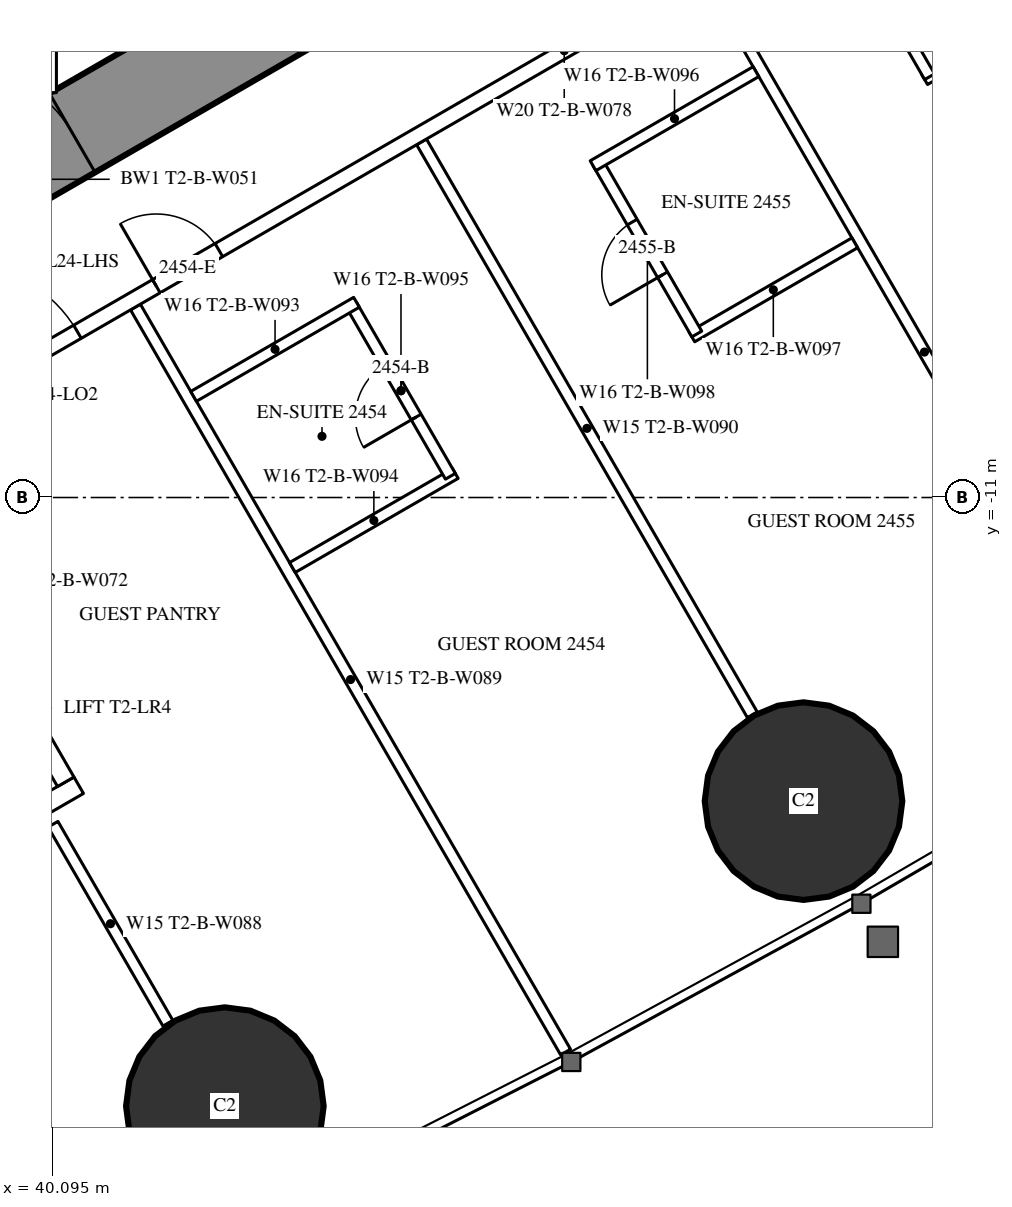
"""IFC4 building model, lengths in metres.
Left out: names, types, materials, properties, quantities, classifications, styles, units other than length and angle.
Written with IfcOpenShell. Run it as: python <this file> out.ifc"""

import sys

from ifc_helpers import new_model, si_unit, direction, frame, frame_2d, origin, origin_2d, place, context, subcontext, project, spatial, rectangle, hollow_circle, extrude, element, fill, save


model = new_model("IFC4")
c1 = context("Model", 3, precision=1e-05, world=origin(), true_north=direction((0.0, 1.0)))
c2 = subcontext(c1, "Body", "Model", "MODEL_VIEW")
j1 = project(units=[si_unit("LENGTHUNIT", "METRE"), si_unit("PLANEANGLEUNIT", "RADIAN")], contexts=[c1])
p1 = place(None, origin())
s1 = spatial("IfcSite", under=j1, at=p1, CompositionType="ELEMENT")
p2 = place(p1, origin())
s2 = spatial("IfcBuilding", under=s1, at=p2, CompositionType="ELEMENT")
p3 = place(p2, frame((0.0, 0.0, 94.1)))
s3 = spatial("IfcBuildingStorey", under=s2, at=p3, CompositionType="ELEMENT", Elevation=94.1)
for number, where, z_axis, x_axis in (
    (1, (42.366, -19.007, 0.0), (0.0, 0.0, 1.0), (1.0, 0.0, 0.0)),
    (2, (49.979, -14.994, 0.0), (0.0, 0.0, 1.0), (1.0, 0.0, 0.0)),
):
    element("IfcColumn", number, at=place(p3, frame(where, z_axis=z_axis, x_axis=x_axis)), inside=s3, PredefinedType="COLUMN", context=c2, shape_type="SweptSolid", body=[
        extrude(hollow_circle(Radius=1.3, WallThickness=0.1, at=origin_2d()), origin(), (0.0, 0.0, 1.0), 3.5),
    ])
p4 = place(p3, frame((27.2, -13.8, 0.0), z_axis=(0.0, 0.0, 1.0), x_axis=(0.866027159892, 0.499996958321, 0.0)))
e3 = element("IfcWall", 3, at=p4, inside=s3, PredefinedType="SHEAR", context=c2, shape_type="SweptSolid", body=[
    extrude(rectangle(XDim=27.947, YDim=1.2, at=frame_2d((13.973, 0.0))), origin(), (0.0, 0.0, 1.0), 3.5),
])
p5 = place(p4, frame((4.6, 0.0, 0.0)))
e4 = element("IfcOpeningElement", 4, at=p5, cuts=e3, PredefinedType="OPENING", context=c2, shape_type="SweptSolid", body=[
    extrude(rectangle(XDim=1.0, YDim=2.2, at=frame_2d((0.5, 1.1))), frame((0.0, 0.61, 0.0), z_axis=(0.0, -1.0, 0.0), x_axis=(1.0, 0.0, 0.0)), (0.0, 0.0, 1.0), 1.22),
])
p6 = place(p4, frame((13.395, 0.0, 0.0)))
e5 = element("IfcOpeningElement", 5, at=p6, cuts=e3, PredefinedType="OPENING", context=c2, shape_type="SweptSolid", body=[
    extrude(rectangle(XDim=1.8, YDim=2.2, at=frame_2d((0.9, 1.1))), frame((0.0, 0.61, 0.0), z_axis=(0.0, -1.0, 0.0), x_axis=(1.0, 0.0, 0.0)), (0.0, 0.0, 1.0), 1.22),
])
p7 = place(p3, frame((41.19, -8.494, 0.0), z_axis=(0.0, 0.0, 1.0), x_axis=(0.49999258054, -0.866029687369, 0.0)))
e6 = element("IfcWall", 6, at=p7, inside=s3, PredefinedType="PARTITIONING", context=c2, shape_type="SweptSolid", body=[
    extrude(rectangle(XDim=11.318, YDim=0.15, at=frame_2d((5.659, 0.0))), origin(), (0.0, 0.0, 1.0), 3.25),
])
p8 = place(p3, frame((44.954, -6.321, 0.0), z_axis=(0.0, 0.0, 1.0), x_axis=(0.500018676722, -0.866014620505, 0.0)))
e7 = element("IfcWall", 7, at=p8, inside=s3, PredefinedType="PARTITIONING", context=c2, shape_type="SweptSolid", body=[
    extrude(rectangle(XDim=8.704, YDim=0.15, at=frame_2d((4.352, 0.0))), origin(), (0.0, 0.0, 1.0), 2.2),
])
p9 = place(p3, frame((48.719, -4.147, 0.0), z_axis=(0.0, 0.0, 1.0), x_axis=(0.499990498062, -0.866030889661, 0.0)))
e8 = element("IfcWall", 8, at=p9, inside=s3, PredefinedType="PARTITIONING", context=c2, shape_type="SweptSolid", body=[
    extrude(rectangle(XDim=11.406, YDim=0.15, at=frame_2d((5.703, 0.0))), origin(), (0.0, 0.0, 1.0), 3.25),
])
p10 = place(p3, frame((40.105, -15.299, 0.0), z_axis=(0.0, 0.0, 1.0), x_axis=(0.499978822259, -0.866037630414, 0.0)))
e9 = element("IfcWall", 9, at=p10, inside=s3, PredefinedType="PARTITIONING", context=c2, shape_type="SweptSolid", body=[
    extrude(rectangle(XDim=3.023, YDim=0.15, at=frame_2d((1.511, 0.0))), origin(), (0.0, 0.0, 1.0), 3.25),
])
p11 = place(p3, frame((37.96, -10.243, 0.0), z_axis=(0.0, 0.0, 1.0), x_axis=(0.866026429433, 0.499998223521, 0.0)))
e10 = element("IfcWall", 10, at=p11, inside=s3, PredefinedType="PARTITIONING", context=c2, shape_type="SweptSolid", body=[
    extrude(rectangle(XDim=20.487, YDim=0.2, at=frame_2d((10.243, 0.0))), origin(), (0.0, 0.0, 1.0), 3.25),
])
p12 = place(p11, frame((4.047, 0.0, 0.0)))
e11 = element("IfcOpeningElement", 11, at=p12, cuts=e10, PredefinedType="OPENING", context=c2, shape_type="SweptSolid", body=[
    extrude(rectangle(XDim=0.95, YDim=2.2, at=frame_2d((0.475, 1.1))), frame((0.0, 0.11, 0.0), z_axis=(0.0, -1.0, 0.0), x_axis=(1.0, 0.0, 0.0)), (0.0, 0.0, 1.0), 0.22),
])
p13 = place(p11, frame((11.04, 0.0, 0.0)))
e12 = element("IfcOpeningElement", 12, at=p13, cuts=e10, PredefinedType="OPENING", context=c2, shape_type="SweptSolid", body=[
    extrude(rectangle(XDim=0.95, YDim=2.2, at=frame_2d((0.475, 1.1))), frame((0.0, 0.11, 0.0), z_axis=(0.0, -1.0, 0.0), x_axis=(1.0, 0.0, 0.0)), (0.0, 0.0, 1.0), 0.22),
])
p14 = place(p11, frame((13.035, 0.0, 0.0)))
e13 = element("IfcOpeningElement", 13, at=p14, cuts=e10, PredefinedType="OPENING", context=c2, shape_type="SweptSolid", body=[
    extrude(rectangle(XDim=0.95, YDim=2.2, at=frame_2d((0.475, 1.1))), frame((0.0, 0.11, 0.0), z_axis=(0.0, -1.0, 0.0), x_axis=(1.0, 0.0, 0.0)), (0.0, 0.0, 1.0), 0.22),
])
p15 = place(p11, frame((17.085, 0.0, 0.0)))
e14 = element("IfcOpeningElement", 14, at=p15, cuts=e10, PredefinedType="OPENING", context=c2, shape_type="SweptSolid", body=[
    extrude(rectangle(XDim=0.95, YDim=2.2, at=frame_2d((0.475, 1.1))), frame((0.0, 0.11, 0.0), z_axis=(0.0, -1.0, 0.0), x_axis=(1.0, 0.0, 0.0)), (0.0, 0.0, 1.0), 0.22),
])
p16 = place(p11, frame((1.048, 0.0, 0.0)))
e15 = element("IfcOpeningElement", 15, at=p16, cuts=e10, PredefinedType="OPENING", context=c2, shape_type="SweptSolid", body=[
    extrude(rectangle(XDim=1.8, YDim=2.2, at=frame_2d((0.9, 1.1))), frame((0.0, 0.11, 0.0), z_axis=(0.0, -1.0, 0.0), x_axis=(1.0, 0.0, 0.0)), (0.0, 0.0, 1.0), 0.22),
])
p17 = place(p3, frame((43.255, -11.921, 0.0), z_axis=(0.0, 0.0, 1.0), x_axis=(0.866006523861, 0.500032699561, 0.0)))
e16 = element("IfcWall", 16, at=p17, inside=s3, PredefinedType="PARTITIONING", context=c2, shape_type="SweptSolid", body=[
    extrude(rectangle(XDim=2.475, YDim=0.15, at=frame_2d((1.237, 0.0))), origin(), (0.0, 0.0, 1.0), 3.25),
])
p18 = place(p3, frame((44.033, -8.469, 0.0), z_axis=(0.0, 0.0, 1.0), x_axis=(0.500047596559, -0.865997922154, 0.0)))
e17 = element("IfcWall", 17, at=p18, inside=s3, PredefinedType="PARTITIONING", context=c2, shape_type="SweptSolid", body=[
    extrude(rectangle(XDim=2.6, YDim=0.15, at=frame_2d((1.3, 0.0))), origin(), (0.0, 0.0, 1.0), 3.25),
])
p19 = place(p18, frame((0.9, 0.0, 0.0)))
e18 = element("IfcOpeningElement", 18, at=p19, cuts=e17, PredefinedType="OPENING", context=c2, shape_type="SweptSolid", body=[
    extrude(rectangle(XDim=0.8, YDim=2.2, at=frame_2d((0.4, 1.1))), frame((0.0, 0.085, 0.0), z_axis=(0.0, -1.0, 0.0), x_axis=(1.0, 0.0, 0.0)), (0.0, 0.0, 1.0), 0.17),
])
p20 = place(p3, frame((41.955, -9.669, 0.0), z_axis=(0.0, 0.0, 1.0), x_axis=(0.866006523861, 0.500032699561, 0.0)))
e19 = element("IfcWall", 19, at=p20, inside=s3, PredefinedType="PARTITIONING", context=c2, shape_type="SweptSolid", body=[
    extrude(rectangle(XDim=2.475, YDim=0.15, at=frame_2d((1.237, 0.0))), origin(), (0.0, 0.0, 1.0), 3.25),
])
p21 = place(p3, frame((48.51, -8.887, 0.0), z_axis=(0.0, 0.0, 1.0), x_axis=(0.866031185235, 0.4999899861, 0.0)))
e20 = element("IfcWall", 20, at=p21, inside=s3, PredefinedType="PARTITIONING", context=c2, shape_type="SweptSolid", body=[
    extrude(rectangle(XDim=2.475, YDim=0.15, at=frame_2d((1.238, 0.0))), origin(), (0.0, 0.0, 1.0), 3.25),
])
p22 = place(p3, frame((47.275, -6.597, 0.0), z_axis=(0.0, 0.0, 1.0), x_axis=(0.499936506574, -0.866062058628, 0.0)))
e21 = element("IfcWall", 21, at=p22, inside=s3, PredefinedType="PARTITIONING", context=c2, shape_type="SweptSolid", body=[
    extrude(rectangle(XDim=2.6, YDim=0.15, at=frame_2d((1.3, 0.0))), origin(), (0.0, 0.0, 1.0), 3.25),
])
p23 = place(p22, frame((0.9, 0.0, 0.0)))
e22 = element("IfcOpeningElement", 22, at=p23, cuts=e21, PredefinedType="OPENING", context=c2, shape_type="SweptSolid", body=[
    extrude(rectangle(XDim=0.8, YDim=2.2, at=frame_2d((0.4, 1.1))), frame((0.0, 0.085, 0.0), z_axis=(0.0, -1.0, 0.0), x_axis=(1.0, 0.0, 0.0)), (0.0, 0.0, 1.0), 0.17),
])
for number, where, z_axis, x_axis in (
    (23, (47.21, -6.635, 0.0), (0.0, 0.0, 1.0), (0.866, 0.5, 0.0)),
    (24, (51.573, -5.502, 0.0), (0.0, 0.0, 1.0), (0.866, 0.5, 0.0)),
):
    element("IfcWall", number, at=place(p3, frame(where, z_axis=z_axis, x_axis=x_axis)), inside=s3, PredefinedType="PARTITIONING", context=c2, shape_type="SweptSolid", body=[
        extrude(rectangle(XDim=2.475, YDim=0.15, at=frame_2d((1.237, 0.0))), origin(), (0.0, 0.0, 1.0), 3.25),
    ])
p24 = place(p3, frame((50.338, -3.213, 0.0), z_axis=(0.0, 0.0, 1.0), x_axis=(0.500047596559, -0.865997922154, 0.0)))
e25 = element("IfcWall", 25, at=p24, inside=s3, PredefinedType="PARTITIONING", context=c2, shape_type="SweptSolid", body=[
    extrude(rectangle(XDim=2.6, YDim=0.15, at=frame_2d((1.3, 0.0))), origin(), (0.0, 0.0, 1.0), 3.25),
])
p25 = place(p24, frame((0.9, 0.0, 0.0)))
e26 = element("IfcOpeningElement", 26, at=p25, cuts=e25, PredefinedType="OPENING", context=c2, shape_type="SweptSolid", body=[
    extrude(rectangle(XDim=0.8, YDim=2.2, at=frame_2d((0.4, 1.1))), frame((0.0, 0.085, 0.0), z_axis=(0.0, -1.0, 0.0), x_axis=(1.0, 0.0, 0.0)), (0.0, 0.0, 1.0), 0.17),
])
p26 = place(p3, frame((40.075, -5.674, 0.0), z_axis=(0.0, 0.0, 1.0), x_axis=(0.0, 1.0, 0.0)))
e27 = element("IfcWall", 27, at=p26, inside=s3, PredefinedType="PARTITIONING", context=c2, shape_type="SweptSolid", body=[
    extrude(rectangle(XDim=6.874, YDim=0.15, at=frame_2d((3.437, 0.0))), origin(), (0.0, 0.0, 1.0), 3.25),
])
p27 = place(p26, frame((2.537, 0.0, 0.0)))
e28 = element("IfcOpeningElement", 28, at=p27, cuts=e27, PredefinedType="OPENING", context=c2, shape_type="SweptSolid", body=[
    extrude(rectangle(XDim=1.8, YDim=2.2, at=frame_2d((0.9, 1.1))), frame((0.0, 0.085, 0.0), z_axis=(0.0, -1.0, 0.0), x_axis=(1.0, 0.0, 0.0)), (0.0, 0.0, 1.0), 0.17),
])
p28 = place(p3, frame((32.996, -19.086, 0.0), z_axis=(0.0, 0.0, 1.0), x_axis=(0.866028165386, 0.499995216735, 0.0)))
e29 = element("IfcWall", 29, at=p28, inside=s3, PredefinedType="PARTITIONING", context=c2, shape_type="SweptSolid", body=[
    extrude(rectangle(XDim=8.6, YDim=0.25, at=frame_2d((4.3, 0.0))), origin(), (0.0, 0.0, 1.0), 3.25),
])
p29 = place(p3, frame((38.673, -11.968, 0.0), z_axis=(0.0, 0.0, 1.0), x_axis=(0.499929347863, -0.866066190972, 0.0)))
e30 = element("IfcWall", 30, at=p29, inside=s3, PredefinedType="PARTITIONING", context=c2, shape_type="SweptSolid", body=[
    extrude(rectangle(XDim=3.201, YDim=0.25, at=frame_2d((1.6, 0.0))), origin(), (0.0, 0.0, 1.0), 3.25),
])
p30 = place(p19, origin())
e31 = element("IfcDoor", 31, at=p30, inside=s3, OperationType="SINGLE_SWING_RIGHT", PredefinedType="DOOR", context=c2, shape_type="SweptSolid", body=[
    extrude(rectangle(XDim=0.8, YDim=2.2, at=frame_2d((0.4, 1.1))), frame((0.0, 0.025, 0.0), z_axis=(0.0, -1.0, 0.0), x_axis=(1.0, 0.0, 0.0)), (0.0, 0.0, 1.0), 0.05),
])
fill(e18, e31)
p31 = place(p12, origin())
e32 = element("IfcDoor", 32, at=p31, inside=s3, OperationType="SINGLE_SWING_LEFT", PredefinedType="DOOR", context=c2, shape_type="SweptSolid", body=[
    extrude(rectangle(XDim=0.95, YDim=2.2, at=frame_2d((0.475, 1.1))), frame((0.0, 0.025, 0.0), z_axis=(0.0, -1.0, 0.0), x_axis=(1.0, 0.0, 0.0)), (0.0, 0.0, 1.0), 0.05),
])
fill(e11, e32)
p32 = place(p23, origin())
e33 = element("IfcDoor", 33, at=p32, inside=s3, OperationType="SINGLE_SWING_RIGHT", PredefinedType="DOOR", context=c2, shape_type="SweptSolid", body=[
    extrude(rectangle(XDim=0.8, YDim=2.2, at=frame_2d((0.4, 1.1))), frame((0.0, 0.025, 0.0), z_axis=(0.0, -1.0, 0.0), x_axis=(1.0, 0.0, 0.0)), (0.0, 0.0, 1.0), 0.05),
])
fill(e22, e33)
p33 = place(p16, origin())
e34 = element("IfcDoor", 34, at=p33, inside=s3, OperationType="DOUBLE_DOOR_SINGLE_SWING", PredefinedType="DOOR", context=c2, shape_type="SweptSolid", body=[
    extrude(rectangle(XDim=1.8, YDim=2.2, at=frame_2d((0.9, 1.1))), frame((0.0, 0.025, 0.0), z_axis=(0.0, -1.0, 0.0), x_axis=(1.0, 0.0, 0.0)), (0.0, 0.0, 1.0), 0.05),
])
fill(e15, e34)
p34 = place(p6, origin())
e35 = element("IfcDoor", 35, at=p34, inside=s3, OperationType="DOUBLE_DOOR_SINGLE_SWING", PredefinedType="DOOR", context=c2, shape_type="SweptSolid", body=[
    extrude(rectangle(XDim=1.8, YDim=2.2, at=frame_2d((0.9, 1.1))), frame((0.0, 0.025, 0.0), z_axis=(0.0, -1.0, 0.0), x_axis=(1.0, 0.0, 0.0)), (0.0, 0.0, 1.0), 0.05),
])
fill(e5, e35)
save(model, sys.argv[1])
